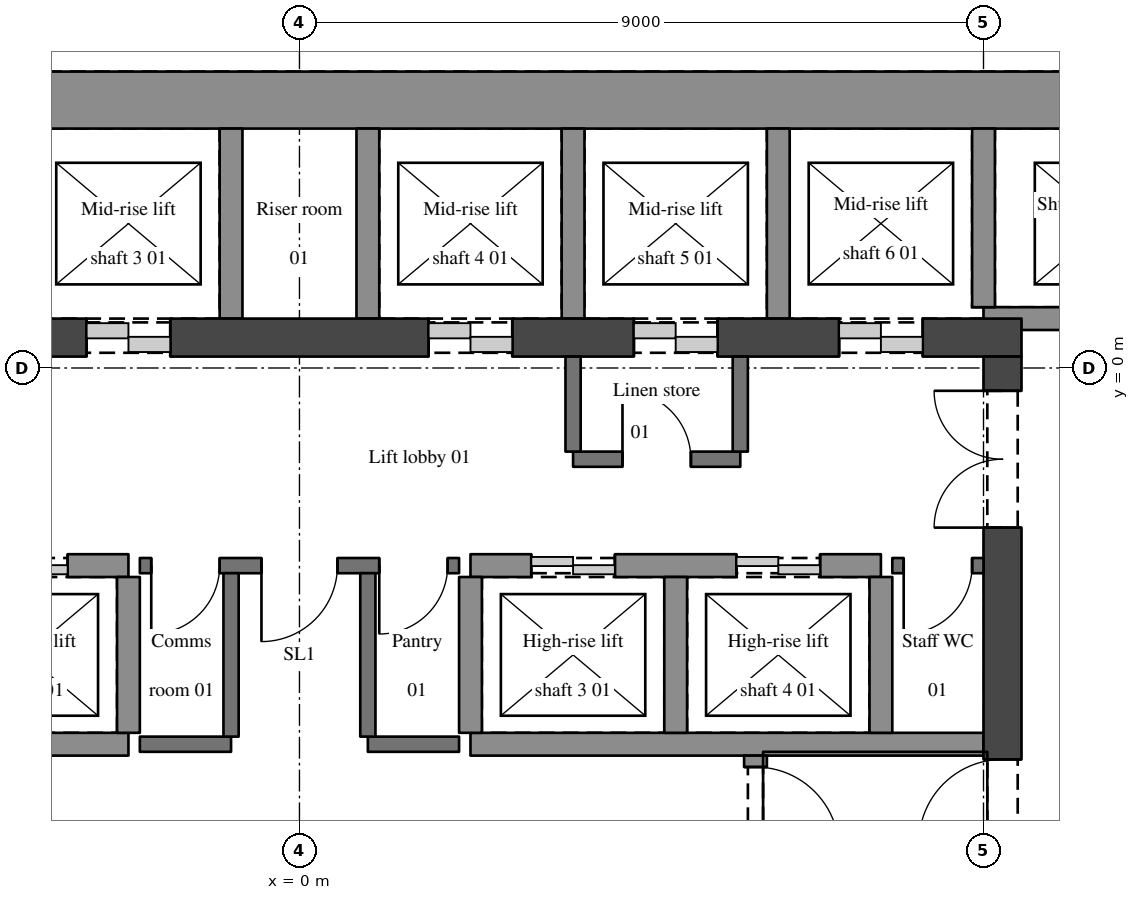
"""IFC4 building model, lengths in metres.
Left out: names, types, materials, properties, quantities, classifications, styles, units other than length and angle.
Written with IfcOpenShell. Run it as: python <this file> out.ifc"""

import sys

from ifc_helpers import new_model, si_unit, direction, frame, frame_2d, origin, place, context, subcontext, project, spatial, rectangle, extrude, element, fill, save


model = new_model("IFC4")
c1 = context("Model", 3, precision=1e-05, world=origin(), true_north=direction((0.0, 1.0)))
c2 = subcontext(c1, "Body", "Model", "MODEL_VIEW")
j1 = project(units=[si_unit("LENGTHUNIT", "METRE"), si_unit("PLANEANGLEUNIT", "RADIAN")], contexts=[c1])
p1 = place(None, origin())
s1 = spatial("IfcSite", under=j1, at=p1, CompositionType="ELEMENT")
p2 = place(p1, origin())
s2 = spatial("IfcBuilding", under=s1, at=p2, CompositionType="ELEMENT")
p3 = place(p2, frame((0.0, 0.0, 162.3)))
s3 = spatial("IfcBuildingStorey", under=s2, at=p3, CompositionType="ELEMENT", Elevation=162.3)
p4 = place(p3, frame((-13.0, 3.525, 0.0), z_axis=(0.0, 0.0, 1.0), x_axis=(1.0, 0.0, 0.0)))
e1 = element("IfcWall", 1, at=p4, inside=s3, PredefinedType="SHEAR", context=c2, shape_type="SweptSolid", body=[
    extrude(rectangle(XDim=26.0, YDim=0.75, at=frame_2d((13.0, 0.0))), origin(), (0.0, 0.0, 1.0), 5.4),
])
p5 = place(p3, frame((-9.5, 0.4, 0.0), z_axis=(0.0, 0.0, 1.0), x_axis=(1.0, 0.0, 0.0)))
e2 = element("IfcWall", 2, at=p5, inside=s3, PredefinedType="SHEAR", context=c2, shape_type="SweptSolid", body=[
    extrude(rectangle(XDim=19.0, YDim=0.5, at=frame_2d((9.5, 0.0))), origin(), (0.0, 0.0, 1.0), 5.4),
])
p6 = place(p5, frame((1.3, 0.0, 0.0)))
e3 = element("IfcOpeningElement", 3, at=p6, cuts=e2, PredefinedType="OPENING", context=c2, shape_type="SweptSolid", body=[
    extrude(rectangle(XDim=1.1, YDim=2.1, at=frame_2d((0.55, 1.05))), frame((0.0, 0.26, 0.0), z_axis=(0.0, -1.0, 0.0), x_axis=(1.0, 0.0, 0.0)), (0.0, 0.0, 1.0), 0.52),
])
p7 = place(p5, frame((4.0, 0.0, 0.0)))
e4 = element("IfcOpeningElement", 4, at=p7, cuts=e2, PredefinedType="OPENING", context=c2, shape_type="SweptSolid", body=[
    extrude(rectangle(XDim=1.1, YDim=2.1, at=frame_2d((0.55, 1.05))), frame((0.0, 0.26, 0.0), z_axis=(0.0, -1.0, 0.0), x_axis=(1.0, 0.0, 0.0)), (0.0, 0.0, 1.0), 0.52),
])
p8 = place(p5, frame((6.7, 0.0, 0.0)))
e5 = element("IfcOpeningElement", 5, at=p8, cuts=e2, PredefinedType="OPENING", context=c2, shape_type="SweptSolid", body=[
    extrude(rectangle(XDim=1.1, YDim=2.1, at=frame_2d((0.55, 1.05))), frame((0.0, 0.26, 0.0), z_axis=(0.0, -1.0, 0.0), x_axis=(1.0, 0.0, 0.0)), (0.0, 0.0, 1.0), 0.52),
])
p9 = place(p5, frame((11.2, 0.0, 0.0)))
e6 = element("IfcOpeningElement", 6, at=p9, cuts=e2, PredefinedType="OPENING", context=c2, shape_type="SweptSolid", body=[
    extrude(rectangle(XDim=1.1, YDim=2.1, at=frame_2d((0.55, 1.05))), frame((0.0, 0.26, 0.0), z_axis=(0.0, -1.0, 0.0), x_axis=(1.0, 0.0, 0.0)), (0.0, 0.0, 1.0), 0.52),
])
p10 = place(p5, frame((13.9, 0.0, 0.0)))
e7 = element("IfcOpeningElement", 7, at=p10, cuts=e2, PredefinedType="OPENING", context=c2, shape_type="SweptSolid", body=[
    extrude(rectangle(XDim=1.1, YDim=2.1, at=frame_2d((0.55, 1.05))), frame((0.0, 0.26, 0.0), z_axis=(0.0, -1.0, 0.0), x_axis=(1.0, 0.0, 0.0)), (0.0, 0.0, 1.0), 0.52),
])
p11 = place(p5, frame((16.6, 0.0, 0.0)))
e8 = element("IfcOpeningElement", 8, at=p11, cuts=e2, PredefinedType="OPENING", context=c2, shape_type="SweptSolid", body=[
    extrude(rectangle(XDim=1.1, YDim=2.1, at=frame_2d((0.55, 1.05))), frame((0.0, 0.26, 0.0), z_axis=(0.0, -1.0, 0.0), x_axis=(1.0, 0.0, 0.0)), (0.0, 0.0, 1.0), 0.52),
])
p12 = place(p3, frame((9.25, -11.5, 0.0), z_axis=(0.0, 0.0, 1.0), x_axis=(0.0, 1.0, 0.0)))
e9 = element("IfcWall", 9, at=p12, inside=s3, PredefinedType="SHEAR", context=c2, shape_type="SweptSolid", body=[
    extrude(rectangle(XDim=11.65, YDim=0.5, at=frame_2d((5.825, 0.0))), origin(), (0.0, 0.0, 1.0), 5.4),
])
p13 = place(p12, frame((9.4, 0.0, 0.0)))
e10 = element("IfcOpeningElement", 10, at=p13, cuts=e9, PredefinedType="OPENING", context=c2, shape_type="SweptSolid", body=[
    extrude(rectangle(XDim=1.8, YDim=2.1, at=frame_2d((0.9, 1.05))), frame((0.0, 0.26, 0.0), z_axis=(0.0, -1.0, 0.0), x_axis=(1.0, 0.0, 0.0)), (0.0, 0.0, 1.0), 0.52),
])
p14 = place(p12, frame((5.25, 0.0, 0.0)))
e11 = element("IfcOpeningElement", 11, at=p14, cuts=e9, PredefinedType="OPENING", context=c2, shape_type="SweptSolid", body=[
    extrude(rectangle(XDim=1.1, YDim=2.1, at=frame_2d((0.55, 1.05))), frame((0.0, 0.26, 0.0), z_axis=(0.0, -1.0, 0.0), x_axis=(1.0, 0.0, 0.0)), (0.0, 0.0, 1.0), 0.52),
])
p15 = place(p3, frame((-9.0, -4.95, 0.0), z_axis=(0.0, 0.0, 1.0), x_axis=(1.0, 0.0, 0.0)))
e12 = element("IfcWall", 12, at=p15, inside=s3, PredefinedType="SHEAR", context=c2, shape_type="SweptSolid", body=[
    extrude(rectangle(XDim=6.75, YDim=0.3, at=frame_2d((3.375, 0.0))), origin(), (0.0, 0.0, 1.0), 5.4),
])
for number, where, z_axis, x_axis in (
    (13, (-2.1, -4.95, 0.0), (0.0, 0.0, 1.0), (1.0, 0.0, 0.0)),
    (14, (0.9, -4.95, 0.0), (0.0, 0.0, 1.0), (1.0, 0.0, 0.0)),
):
    element("IfcWall", number, at=place(p3, frame(where, z_axis=z_axis, x_axis=x_axis)), inside=s3, PredefinedType="SOLIDWALL", context=c2, shape_type="SweptSolid", body=[
        extrude(rectangle(XDim=1.2, YDim=0.2, at=frame_2d((0.6, 0.0))), origin(), (0.0, 0.0, 1.0), 5.1),
    ])
p16 = place(p3, frame((2.25, -4.95, 0.0), z_axis=(0.0, 0.0, 1.0), x_axis=(1.0, 0.0, 0.0)))
e15 = element("IfcWall", 15, at=p16, inside=s3, PredefinedType="SHEAR", context=c2, shape_type="SweptSolid", body=[
    extrude(rectangle(XDim=6.75, YDim=0.3, at=frame_2d((3.375, 0.0))), origin(), (0.0, 0.0, 1.0), 5.4),
])
p17 = place(p3, frame((-7.65, -2.6, 0.0), z_axis=(0.0, 0.0, 1.0), x_axis=(1.0, 0.0, 0.0)))
e16 = element("IfcWall", 16, at=p17, inside=s3, PredefinedType="SHEAR", context=c2, shape_type="SweptSolid", body=[
    extrude(rectangle(XDim=5.4, YDim=0.3, at=frame_2d((2.7, 0.0))), origin(), (0.0, 0.0, 1.0), 5.4),
])
p18 = place(p17, frame((0.8, 0.0, 0.0)))
e17 = element("IfcOpeningElement", 17, at=p18, cuts=e16, PredefinedType="OPENING", context=c2, shape_type="SweptSolid", body=[
    extrude(rectangle(XDim=1.1, YDim=2.1, at=frame_2d((0.55, 1.05))), frame((0.0, 0.16, 0.0), z_axis=(0.0, -1.0, 0.0), x_axis=(1.0, 0.0, 0.0)), (0.0, 0.0, 1.0), 0.32),
])
p19 = place(p17, frame((3.5, 0.0, 0.0)))
e18 = element("IfcOpeningElement", 18, at=p19, cuts=e16, PredefinedType="OPENING", context=c2, shape_type="SweptSolid", body=[
    extrude(rectangle(XDim=1.1, YDim=2.1, at=frame_2d((0.55, 1.05))), frame((0.0, 0.16, 0.0), z_axis=(0.0, -1.0, 0.0), x_axis=(1.0, 0.0, 0.0)), (0.0, 0.0, 1.0), 0.32),
])
p20 = place(p3, frame((2.1, -2.6, 0.0), z_axis=(0.0, 0.0, 1.0), x_axis=(-1.0, 0.0, 0.0)))
e19 = element("IfcWall", 19, at=p20, inside=s3, PredefinedType="SOLIDWALL", context=c2, shape_type="SweptSolid", body=[
    extrude(rectangle(XDim=4.2, YDim=0.2, at=frame_2d((2.1, 0.0))), origin(), (0.0, 0.0, 1.0), 5.1),
])
p21 = place(p20, frame((1.6, 0.0, 0.0)))
e20 = element("IfcOpeningElement", 20, at=p21, cuts=e19, PredefinedType="OPENING", context=c2, shape_type="SweptSolid", body=[
    extrude(rectangle(XDim=1.0, YDim=2.1, at=frame_2d((0.5, 1.05))), frame((0.0, 0.11, 0.0), z_axis=(0.0, -1.0, 0.0), x_axis=(1.0, 0.0, 0.0)), (0.0, 0.0, 1.0), 0.22),
])
p22 = place(p20, frame((3.15, 0.0, 0.0)))
e21 = element("IfcOpeningElement", 21, at=p22, cuts=e19, PredefinedType="OPENING", context=c2, shape_type="SweptSolid", body=[
    extrude(rectangle(XDim=0.9, YDim=2.1, at=frame_2d((0.45, 1.05))), frame((0.0, 0.11, 0.0), z_axis=(0.0, -1.0, 0.0), x_axis=(1.0, 0.0, 0.0)), (0.0, 0.0, 1.0), 0.22),
])
p23 = place(p20, frame((0.15, 0.0, 0.0)))
e22 = element("IfcOpeningElement", 22, at=p23, cuts=e19, PredefinedType="OPENING", context=c2, shape_type="SweptSolid", body=[
    extrude(rectangle(XDim=0.9, YDim=2.1, at=frame_2d((0.45, 1.05))), frame((0.0, 0.11, 0.0), z_axis=(0.0, -1.0, 0.0), x_axis=(1.0, 0.0, 0.0)), (0.0, 0.0, 1.0), 0.22),
])
p24 = place(p3, frame((2.25, -2.6, 0.0), z_axis=(0.0, 0.0, 1.0), x_axis=(1.0, 0.0, 0.0)))
e23 = element("IfcWall", 23, at=p24, inside=s3, PredefinedType="SHEAR", context=c2, shape_type="SweptSolid", body=[
    extrude(rectangle(XDim=5.4, YDim=0.3, at=frame_2d((2.7, 0.0))), origin(), (0.0, 0.0, 1.0), 5.4),
])
p25 = place(p24, frame((0.8, 0.0, 0.0)))
e24 = element("IfcOpeningElement", 24, at=p25, cuts=e23, PredefinedType="OPENING", context=c2, shape_type="SweptSolid", body=[
    extrude(rectangle(XDim=1.1, YDim=2.1, at=frame_2d((0.55, 1.05))), frame((0.0, 0.16, 0.0), z_axis=(0.0, -1.0, 0.0), x_axis=(1.0, 0.0, 0.0)), (0.0, 0.0, 1.0), 0.32),
])
p26 = place(p24, frame((3.5, 0.0, 0.0)))
e25 = element("IfcOpeningElement", 25, at=p26, cuts=e23, PredefinedType="OPENING", context=c2, shape_type="SweptSolid", body=[
    extrude(rectangle(XDim=1.1, YDim=2.1, at=frame_2d((0.55, 1.05))), frame((0.0, 0.16, 0.0), z_axis=(0.0, -1.0, 0.0), x_axis=(1.0, 0.0, 0.0)), (0.0, 0.0, 1.0), 0.32),
])
p27 = place(p3, frame((9.0, -2.6, 0.0), z_axis=(0.0, 0.0, 1.0), x_axis=(-1.0, 0.0, 0.0)))
e26 = element("IfcWall", 26, at=p27, inside=s3, PredefinedType="SOLIDWALL", context=c2, shape_type="SweptSolid", body=[
    extrude(rectangle(XDim=1.2, YDim=0.2, at=frame_2d((0.6, 0.0))), origin(), (0.0, 0.0, 1.0), 5.1),
])
p28 = place(p27, frame((0.15, 0.0, 0.0)))
e27 = element("IfcOpeningElement", 27, at=p28, cuts=e26, PredefinedType="OPENING", context=c2, shape_type="SweptSolid", body=[
    extrude(rectangle(XDim=0.9, YDim=2.1, at=frame_2d((0.45, 1.05))), frame((0.0, 0.11, 0.0), z_axis=(0.0, -1.0, 0.0), x_axis=(1.0, 0.0, 0.0)), (0.0, 0.0, 1.0), 0.22),
])
p29 = place(p3, frame((3.6, -1.2, 0.0), z_axis=(0.0, 0.0, 1.0), x_axis=(1.0, 0.0, 0.0)))
e28 = element("IfcWall", 28, at=p29, inside=s3, PredefinedType="SOLIDWALL", context=c2, shape_type="SweptSolid", body=[
    extrude(rectangle(XDim=2.2, YDim=0.2, at=frame_2d((1.1, 0.0))), origin(), (0.0, 0.0, 1.0), 5.1),
])
p30 = place(p29, frame((0.65, 0.0, 0.0)))
e29 = element("IfcOpeningElement", 29, at=p30, cuts=e28, PredefinedType="OPENING", context=c2, shape_type="SweptSolid", body=[
    extrude(rectangle(XDim=0.9, YDim=2.1, at=frame_2d((0.45, 1.05))), frame((0.0, 0.11, 0.0), z_axis=(0.0, -1.0, 0.0), x_axis=(1.0, 0.0, 0.0)), (0.0, 0.0, 1.0), 0.22),
])
p31 = place(p3, frame((12.25, 0.65, 0.0), z_axis=(0.0, 0.0, 1.0), x_axis=(-1.0, 0.0, 0.0)))
e30 = element("IfcWall", 30, at=p31, inside=s3, PredefinedType="SHEAR", context=c2, shape_type="SweptSolid", body=[
    extrude(rectangle(XDim=3.25, YDim=0.3, at=frame_2d((1.625, 0.0))), origin(), (0.0, 0.0, 1.0), 5.4),
])
p32 = place(p31, frame((1.1, 0.0, 0.0)))
e31 = element("IfcOpeningElement", 31, at=p32, cuts=e30, PredefinedType="OPENING", context=c2, shape_type="SweptSolid", body=[
    extrude(rectangle(XDim=1.1, YDim=2.1, at=frame_2d((0.55, 1.05))), frame((0.0, 0.16, 0.0), z_axis=(0.0, -1.0, 0.0), x_axis=(1.0, 0.0, 0.0)), (0.0, 0.0, 1.0), 0.32),
])
p33 = place(p3, frame((-2.25, -4.8, 0.0), z_axis=(0.0, 0.0, 1.0), x_axis=(0.0, 1.0, 0.0)))
e32 = element("IfcWall", 32, at=p33, inside=s3, PredefinedType="SHEAR", context=c2, shape_type="SweptSolid", body=[
    extrude(rectangle(XDim=2.05, YDim=0.3, at=frame_2d((1.025, 0.0))), origin(), (0.0, 0.0, 1.0), 5.4),
])
p34 = place(p3, frame((-0.9, -4.85, 0.0), z_axis=(0.0, 0.0, 1.0), x_axis=(0.0, 1.0, 0.0)))
e33 = element("IfcWall", 33, at=p34, inside=s3, PredefinedType="SOLIDWALL", context=c2, shape_type="SweptSolid", body=[
    extrude(rectangle(XDim=2.15, YDim=0.2, at=frame_2d((1.075, 0.0))), origin(), (0.0, 0.0, 1.0), 5.1),
])
p35 = place(p3, frame((-0.9, 0.65, 0.0), z_axis=(0.0, 0.0, 1.0), x_axis=(0.0, 1.0, 0.0)))
e34 = element("IfcWall", 34, at=p35, inside=s3, PredefinedType="SHEAR", context=c2, shape_type="SweptSolid", body=[
    extrude(rectangle(XDim=2.5, YDim=0.3, at=frame_2d((1.25, 0.0))), origin(), (0.0, 0.0, 1.0), 5.4),
])
p36 = place(p3, frame((0.9, -4.85, 0.0), z_axis=(0.0, 0.0, 1.0), x_axis=(0.0, 1.0, 0.0)))
e35 = element("IfcWall", 35, at=p36, inside=s3, PredefinedType="SOLIDWALL", context=c2, shape_type="SweptSolid", body=[
    extrude(rectangle(XDim=2.15, YDim=0.2, at=frame_2d((1.075, 0.0))), origin(), (0.0, 0.0, 1.0), 5.1),
])
p37 = place(p3, frame((0.9, 0.65, 0.0), z_axis=(0.0, 0.0, 1.0), x_axis=(0.0, 1.0, 0.0)))
e36 = element("IfcWall", 36, at=p37, inside=s3, PredefinedType="SHEAR", context=c2, shape_type="SweptSolid", body=[
    extrude(rectangle(XDim=2.5, YDim=0.3, at=frame_2d((1.25, 0.0))), origin(), (0.0, 0.0, 1.0), 5.4),
])
p38 = place(p3, frame((2.25, -4.8, 0.0), z_axis=(0.0, 0.0, 1.0), x_axis=(0.0, 1.0, 0.0)))
e37 = element("IfcWall", 37, at=p38, inside=s3, PredefinedType="SHEAR", context=c2, shape_type="SweptSolid", body=[
    extrude(rectangle(XDim=2.05, YDim=0.3, at=frame_2d((1.025, 0.0))), origin(), (0.0, 0.0, 1.0), 5.4),
])
p39 = place(p3, frame((3.6, -1.1, 0.0), z_axis=(0.0, 0.0, 1.0), x_axis=(0.0, 1.0, 0.0)))
e38 = element("IfcWall", 38, at=p39, inside=s3, PredefinedType="SOLIDWALL", context=c2, shape_type="SweptSolid", body=[
    extrude(rectangle(XDim=1.25, YDim=0.2, at=frame_2d((0.625, 0.0))), origin(), (0.0, 0.0, 1.0), 5.1),
])
p40 = place(p3, frame((3.6, 0.65, 0.0), z_axis=(0.0, 0.0, 1.0), x_axis=(0.0, 1.0, 0.0)))
e39 = element("IfcWall", 39, at=p40, inside=s3, PredefinedType="SHEAR", context=c2, shape_type="SweptSolid", body=[
    extrude(rectangle(XDim=2.5, YDim=0.3, at=frame_2d((1.25, 0.0))), origin(), (0.0, 0.0, 1.0), 5.4),
])
p41 = place(p3, frame((4.95, -4.8, 0.0), z_axis=(0.0, 0.0, 1.0), x_axis=(0.0, 1.0, 0.0)))
e40 = element("IfcWall", 40, at=p41, inside=s3, PredefinedType="SHEAR", context=c2, shape_type="SweptSolid", body=[
    extrude(rectangle(XDim=2.05, YDim=0.3, at=frame_2d((1.025, 0.0))), origin(), (0.0, 0.0, 1.0), 5.4),
])
p42 = place(p3, frame((5.8, -1.1, 0.0), z_axis=(0.0, 0.0, 1.0), x_axis=(0.0, 1.0, 0.0)))
e41 = element("IfcWall", 41, at=p42, inside=s3, PredefinedType="SOLIDWALL", context=c2, shape_type="SweptSolid", body=[
    extrude(rectangle(XDim=1.25, YDim=0.2, at=frame_2d((0.625, 0.0))), origin(), (0.0, 0.0, 1.0), 5.1),
])
p43 = place(p3, frame((6.0, -5.1, 0.0), z_axis=(0.0, 0.0, 1.0), x_axis=(0.0, -1.0, 0.0)))
e42 = element("IfcWall", 42, at=p43, inside=s3, PredefinedType="SHEAR", context=c2, shape_type="SweptSolid", body=[
    extrude(rectangle(XDim=6.4, YDim=0.3, at=frame_2d((3.2, 0.0))), origin(), (0.0, 0.0, 1.0), 5.4),
])
p44 = place(p43, frame((0.15, 0.0, 0.0)))
e43 = element("IfcOpeningElement", 43, at=p44, cuts=e42, PredefinedType="OPENING", context=c2, shape_type="SweptSolid", body=[
    extrude(rectangle(XDim=1.1, YDim=2.1, at=frame_2d((0.55, 1.05))), frame((0.0, 0.16, 0.0), z_axis=(0.0, -1.0, 0.0), x_axis=(1.0, 0.0, 0.0)), (0.0, 0.0, 1.0), 0.32),
])
p45 = place(p3, frame((6.3, 0.65, 0.0), z_axis=(0.0, 0.0, 1.0), x_axis=(0.0, 1.0, 0.0)))
e44 = element("IfcWall", 44, at=p45, inside=s3, PredefinedType="SHEAR", context=c2, shape_type="SweptSolid", body=[
    extrude(rectangle(XDim=2.5, YDim=0.3, at=frame_2d((1.25, 0.0))), origin(), (0.0, 0.0, 1.0), 5.4),
])
p46 = place(p3, frame((7.65, -4.8, 0.0), z_axis=(0.0, 0.0, 1.0), x_axis=(0.0, 1.0, 0.0)))
e45 = element("IfcWall", 45, at=p46, inside=s3, PredefinedType="SHEAR", context=c2, shape_type="SweptSolid", body=[
    extrude(rectangle(XDim=2.05, YDim=0.3, at=frame_2d((1.025, 0.0))), origin(), (0.0, 0.0, 1.0), 5.4),
])
p47 = place(p3, frame((9.0, 0.8, 0.0), z_axis=(0.0, 0.0, 1.0), x_axis=(0.0, 1.0, 0.0)))
e46 = element("IfcWall", 46, at=p47, inside=s3, PredefinedType="SHEAR", context=c2, shape_type="SweptSolid", body=[
    extrude(rectangle(XDim=2.35, YDim=0.3, at=frame_2d((1.175, 0.0))), origin(), (0.0, 0.0, 1.0), 5.4),
])
p48 = place(p13, origin())
e47 = element("IfcDoor", 47, at=p48, inside=s3, OperationType="DOUBLE_DOOR_SINGLE_SWING", PredefinedType="DOOR", context=c2, shape_type="SweptSolid", body=[
    extrude(rectangle(XDim=1.8, YDim=2.1, at=frame_2d((0.9, 1.05))), frame((0.0, 0.025, 0.0), z_axis=(0.0, -1.0, 0.0), x_axis=(1.0, 0.0, 0.0)), (0.0, 0.0, 1.0), 0.05),
])
fill(e10, e47)
p49 = place(p21, origin())
e48 = element("IfcDoor", 48, at=p49, inside=s3, OperationType="SINGLE_SWING_RIGHT", PredefinedType="DOOR", context=c2, shape_type="SweptSolid", body=[
    extrude(rectangle(XDim=1.0, YDim=2.1, at=frame_2d((0.5, 1.05))), frame((0.0, 0.025, 0.0), z_axis=(0.0, -1.0, 0.0), x_axis=(1.0, 0.0, 0.0)), (0.0, 0.0, 1.0), 0.05),
])
fill(e20, e48)
p50 = place(p44, origin())
e49 = element("IfcDoor", 49, at=p50, inside=s3, OperationType="SINGLE_SWING_RIGHT", PredefinedType="DOOR", context=c2, shape_type="SweptSolid", body=[
    extrude(rectangle(XDim=1.1, YDim=2.1, at=frame_2d((0.55, 1.05))), frame((0.0, 0.025, 0.0), z_axis=(0.0, -1.0, 0.0), x_axis=(1.0, 0.0, 0.0)), (0.0, 0.0, 1.0), 0.05),
])
fill(e43, e49)
p51 = place(p14, origin())
e50 = element("IfcDoor", 50, at=p51, inside=s3, OperationType="SINGLE_SWING_LEFT", PredefinedType="DOOR", context=c2, shape_type="SweptSolid", body=[
    extrude(rectangle(XDim=1.1, YDim=2.1, at=frame_2d((0.55, 1.05))), frame((0.0, 0.025, 0.0), z_axis=(0.0, -1.0, 0.0), x_axis=(1.0, 0.0, 0.0)), (0.0, 0.0, 1.0), 0.05),
])
fill(e11, e50)
p52 = place(p22, origin())
e51 = element("IfcDoor", 51, at=p52, inside=s3, OperationType="SINGLE_SWING_RIGHT", PredefinedType="DOOR", context=c2, shape_type="SweptSolid", body=[
    extrude(rectangle(XDim=0.9, YDim=2.1, at=frame_2d((0.45, 1.05))), frame((0.0, 0.025, 0.0), z_axis=(0.0, -1.0, 0.0), x_axis=(1.0, 0.0, 0.0)), (0.0, 0.0, 1.0), 0.05),
])
fill(e21, e51)
p53 = place(p23, origin())
e52 = element("IfcDoor", 52, at=p53, inside=s3, OperationType="SINGLE_SWING_RIGHT", PredefinedType="DOOR", context=c2, shape_type="SweptSolid", body=[
    extrude(rectangle(XDim=0.9, YDim=2.1, at=frame_2d((0.45, 1.05))), frame((0.0, 0.025, 0.0), z_axis=(0.0, -1.0, 0.0), x_axis=(1.0, 0.0, 0.0)), (0.0, 0.0, 1.0), 0.05),
])
fill(e22, e52)
p54 = place(p28, origin())
e53 = element("IfcDoor", 53, at=p54, inside=s3, OperationType="SINGLE_SWING_RIGHT", PredefinedType="DOOR", context=c2, shape_type="SweptSolid", body=[
    extrude(rectangle(XDim=0.9, YDim=2.1, at=frame_2d((0.45, 1.05))), frame((0.0, 0.025, 0.0), z_axis=(0.0, -1.0, 0.0), x_axis=(1.0, 0.0, 0.0)), (0.0, 0.0, 1.0), 0.05),
])
fill(e27, e53)
p55 = place(p30, origin())
e54 = element("IfcDoor", 54, at=p55, inside=s3, OperationType="SINGLE_SWING_LEFT", PredefinedType="DOOR", context=c2, shape_type="SweptSolid", body=[
    extrude(rectangle(XDim=0.9, YDim=2.1, at=frame_2d((0.45, 1.05))), frame((0.0, 0.025, 0.0), z_axis=(0.0, -1.0, 0.0), x_axis=(1.0, 0.0, 0.0)), (0.0, 0.0, 1.0), 0.05),
])
fill(e29, e54)
p56 = place(p19, origin())
e55 = element("IfcDoor", 55, at=p56, inside=s3, OperationType="DOUBLE_DOOR_SLIDING", PredefinedType="DOOR", context=c2, shape_type="SweptSolid", body=[
    extrude(rectangle(XDim=1.1, YDim=2.1, at=frame_2d((0.55, 1.05))), frame((0.0, 0.025, 0.0), z_axis=(0.0, -1.0, 0.0), x_axis=(1.0, 0.0, 0.0)), (0.0, 0.0, 1.0), 0.05),
])
fill(e18, e55)
p57 = place(p25, origin())
e56 = element("IfcDoor", 56, at=p57, inside=s3, OperationType="DOUBLE_DOOR_SLIDING", PredefinedType="DOOR", context=c2, shape_type="SweptSolid", body=[
    extrude(rectangle(XDim=1.1, YDim=2.1, at=frame_2d((0.55, 1.05))), frame((0.0, 0.025, 0.0), z_axis=(0.0, -1.0, 0.0), x_axis=(1.0, 0.0, 0.0)), (0.0, 0.0, 1.0), 0.05),
])
fill(e24, e56)
p58 = place(p26, origin())
e57 = element("IfcDoor", 57, at=p58, inside=s3, OperationType="DOUBLE_DOOR_SLIDING", PredefinedType="DOOR", context=c2, shape_type="SweptSolid", body=[
    extrude(rectangle(XDim=1.1, YDim=2.1, at=frame_2d((0.55, 1.05))), frame((0.0, 0.025, 0.0), z_axis=(0.0, -1.0, 0.0), x_axis=(1.0, 0.0, 0.0)), (0.0, 0.0, 1.0), 0.05),
])
fill(e25, e57)
p59 = place(p8, origin())
e58 = element("IfcDoor", 58, at=p59, inside=s3, OperationType="DOUBLE_DOOR_SLIDING", PredefinedType="DOOR", context=c2, shape_type="SweptSolid", body=[
    extrude(rectangle(XDim=1.1, YDim=2.1, at=frame_2d((0.55, 1.05))), frame((0.0, 0.025, 0.0), z_axis=(0.0, -1.0, 0.0), x_axis=(1.0, 0.0, 0.0)), (0.0, 0.0, 1.0), 0.05),
])
fill(e5, e58)
p60 = place(p9, origin())
e59 = element("IfcDoor", 59, at=p60, inside=s3, OperationType="DOUBLE_DOOR_SLIDING", PredefinedType="DOOR", context=c2, shape_type="SweptSolid", body=[
    extrude(rectangle(XDim=1.1, YDim=2.1, at=frame_2d((0.55, 1.05))), frame((0.0, 0.025, 0.0), z_axis=(0.0, -1.0, 0.0), x_axis=(1.0, 0.0, 0.0)), (0.0, 0.0, 1.0), 0.05),
])
fill(e6, e59)
p61 = place(p10, origin())
e60 = element("IfcDoor", 60, at=p61, inside=s3, OperationType="DOUBLE_DOOR_SLIDING", PredefinedType="DOOR", context=c2, shape_type="SweptSolid", body=[
    extrude(rectangle(XDim=1.1, YDim=2.1, at=frame_2d((0.55, 1.05))), frame((0.0, 0.025, 0.0), z_axis=(0.0, -1.0, 0.0), x_axis=(1.0, 0.0, 0.0)), (0.0, 0.0, 1.0), 0.05),
])
fill(e7, e60)
p62 = place(p11, origin())
e61 = element("IfcDoor", 61, at=p62, inside=s3, OperationType="DOUBLE_DOOR_SLIDING", PredefinedType="DOOR", context=c2, shape_type="SweptSolid", body=[
    extrude(rectangle(XDim=1.1, YDim=2.1, at=frame_2d((0.55, 1.05))), frame((0.0, 0.025, 0.0), z_axis=(0.0, -1.0, 0.0), x_axis=(1.0, 0.0, 0.0)), (0.0, 0.0, 1.0), 0.05),
])
fill(e8, e61)
save(model, sys.argv[1])
